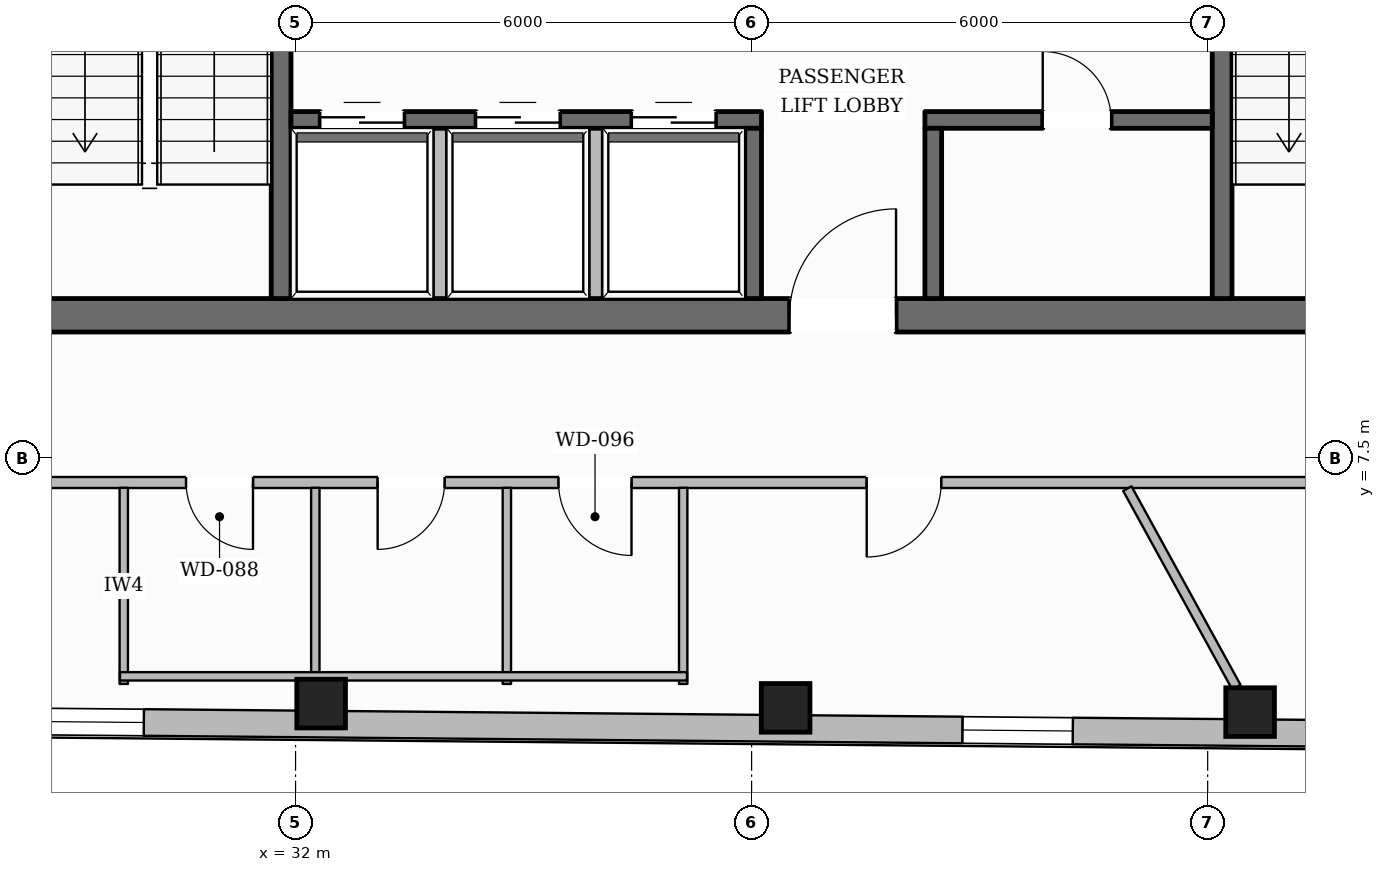
"""IFC4 building model, lengths in metres.
Left out: names, types, materials, properties, quantities, classifications, styles, units other than length and angle.
Written with IfcOpenShell. Run it as: python <this file> out.ifc"""

import sys

from ifc_helpers import new_model, si_unit, direction, frame, frame_2d, origin, origin_2d, place, context, subcontext, project, spatial, rectangle, hollow_rectangle, extrude, element, fill, save


model = new_model("IFC4")
c1 = context("Model", 3, precision=1e-05, world=origin(), true_north=direction((0.0, 1.0)))
c2 = subcontext(c1, "Body", "Model", "MODEL_VIEW")
j1 = project(units=[si_unit("LENGTHUNIT", "METRE"), si_unit("PLANEANGLEUNIT", "RADIAN")], contexts=[c1])
p1 = place(None, origin())
s1 = spatial("IfcSite", under=j1, at=p1, CompositionType="ELEMENT")
p2 = place(p1, origin())
s2 = spatial("IfcBuilding", under=s1, at=p2, CompositionType="ELEMENT")
p3 = place(p2, frame((0.0, 0.0, 180.4)))
s3 = spatial("IfcBuildingStorey", under=s2, at=p3, CompositionType="ELEMENT", Elevation=180.4)
p4 = place(p3, frame((28.04, 9.38, 0.0), z_axis=(0.0, 0.0, 1.0), x_axis=(1.0, 0.0, 0.0)))
e1 = element("IfcWall", 1, at=p4, inside=s3, PredefinedType="SOLIDWALL", context=c2, shape_type="SweptSolid", body=[
    extrude(rectangle(XDim=19.92, YDim=0.44, at=frame_2d((9.96, 0.0))), origin(), (0.0, 0.0, 1.0), 3.6),
])
p5 = place(p4, frame((10.46, 0.0, 0.0)))
e2 = element("IfcOpeningElement", 2, at=p5, cuts=e1, PredefinedType="OPENING", context=c2, shape_type="SweptSolid", body=[
    extrude(rectangle(XDim=1.4, YDim=2.2, at=frame_2d((0.7, 1.1))), frame((0.0, 0.23, 0.0), z_axis=(0.0, -1.0, 0.0), x_axis=(1.0, 0.0, 0.0)), (0.0, 0.0, 1.0), 0.46),
])
p6 = place(p3, frame((31.81, 9.6, 0.0), z_axis=(0.0, 0.0, 1.0), x_axis=(0.0, 1.0, 0.0)))
e3 = element("IfcWall", 3, at=p6, inside=s3, PredefinedType="SHEAR", context=c2, shape_type="SweptSolid", body=[
    extrude(rectangle(XDim=13.0, YDim=0.26, at=frame_2d((6.5, 0.0))), origin(), (0.0, 0.0, 1.0), 3.6),
])
p7 = place(p6, frame((10.925, 0.0, 0.0)))
e4 = element("IfcOpeningElement", 4, at=p7, cuts=e3, PredefinedType="OPENING", context=c2, shape_type="SweptSolid", body=[
    extrude(rectangle(XDim=1.25, YDim=2.25, at=frame_2d((0.625, 1.125))), frame((0.0, 0.14, 0.0), z_axis=(0.0, -1.0, 0.0), x_axis=(1.0, 0.0, 0.0)), (0.0, 0.0, 1.0), 0.28),
])
p8 = place(p3, frame((44.19, 9.6, 0.0), z_axis=(0.0, 0.0, 1.0), x_axis=(0.0, 1.0, 0.0)))
e5 = element("IfcWall", 5, at=p8, inside=s3, PredefinedType="SHEAR", context=c2, shape_type="SweptSolid", body=[
    extrude(rectangle(XDim=13.0, YDim=0.26, at=frame_2d((6.5, 0.0))), origin(), (0.0, 0.0, 1.0), 3.6),
])
p9 = place(p8, frame((10.925, 0.0, 0.0)))
e6 = element("IfcOpeningElement", 6, at=p9, cuts=e5, PredefinedType="OPENING", context=c2, shape_type="SweptSolid", body=[
    extrude(rectangle(XDim=1.25, YDim=2.25, at=frame_2d((0.625, 1.125))), frame((0.0, 0.14, 0.0), z_axis=(0.0, -1.0, 0.0), x_axis=(1.0, 0.0, 0.0)), (0.0, 0.0, 1.0), 0.28),
])
p10 = place(p3, frame((31.94, 11.95, 0.0), z_axis=(0.0, 0.0, 1.0), x_axis=(1.0, 0.0, 0.0)))
e7 = element("IfcWall", 7, at=p10, inside=s3, PredefinedType="SOLIDWALL", context=c2, shape_type="SweptSolid", body=[
    extrude(rectangle(XDim=6.19, YDim=0.22, at=frame_2d((3.095, 0.0))), origin(), (0.0, 0.0, 1.0), 3.6),
])
p11 = place(p10, frame((0.385, 0.0, 0.0)))
e8 = element("IfcOpeningElement", 8, at=p11, cuts=e7, PredefinedType="OPENING", context=c2, shape_type="SweptSolid", body=[
    extrude(rectangle(XDim=1.1, YDim=2.2, at=frame_2d((0.55, 1.1))), frame((0.0, 0.12, 0.0), z_axis=(0.0, -1.0, 0.0), x_axis=(1.0, 0.0, 0.0)), (0.0, 0.0, 1.0), 0.24),
])
p12 = place(p10, frame((2.435, 0.0, 0.0)))
e9 = element("IfcOpeningElement", 9, at=p12, cuts=e7, PredefinedType="OPENING", context=c2, shape_type="SweptSolid", body=[
    extrude(rectangle(XDim=1.1, YDim=2.2, at=frame_2d((0.55, 1.1))), frame((0.0, 0.12, 0.0), z_axis=(0.0, -1.0, 0.0), x_axis=(1.0, 0.0, 0.0)), (0.0, 0.0, 1.0), 0.24),
])
p13 = place(p10, frame((4.485, 0.0, 0.0)))
e10 = element("IfcOpeningElement", 10, at=p13, cuts=e7, PredefinedType="OPENING", context=c2, shape_type="SweptSolid", body=[
    extrude(rectangle(XDim=1.1, YDim=2.2, at=frame_2d((0.55, 1.1))), frame((0.0, 0.12, 0.0), z_axis=(0.0, -1.0, 0.0), x_axis=(1.0, 0.0, 0.0)), (0.0, 0.0, 1.0), 0.24),
])
p14 = place(p3, frame((40.28, 11.95, 0.0), z_axis=(0.0, 0.0, 1.0), x_axis=(1.0, 0.0, 0.0)))
e11 = element("IfcWall", 11, at=p14, inside=s3, PredefinedType="SOLIDWALL", context=c2, shape_type="SweptSolid", body=[
    extrude(rectangle(XDim=3.78, YDim=0.22, at=frame_2d((1.89, 0.0))), origin(), (0.0, 0.0, 1.0), 3.6),
])
p15 = place(p14, frame((1.55, 0.0, 0.0)))
e12 = element("IfcOpeningElement", 12, at=p15, cuts=e11, PredefinedType="OPENING", context=c2, shape_type="SweptSolid", body=[
    extrude(rectangle(XDim=0.9, YDim=2.1, at=frame_2d((0.45, 1.05))), frame((0.0, 0.12, 0.0), z_axis=(0.0, -1.0, 0.0), x_axis=(1.0, 0.0, 0.0)), (0.0, 0.0, 1.0), 0.24),
])
for number, where, z_axis, x_axis in (
    (13, (38.02, 9.6, 0.0), (0.0, 0.0, 1.0), (0.0, 1.0, 0.0)),
    (14, (40.39, 9.6, 0.0), (0.0, 0.0, 1.0), (0.0, 1.0, 0.0)),
):
    element("IfcWall", number, at=place(p3, frame(where, z_axis=z_axis, x_axis=x_axis)), inside=s3, PredefinedType="SOLIDWALL", context=c2, shape_type="SweptSolid", body=[
        extrude(rectangle(XDim=2.24, YDim=0.22, at=frame_2d((1.12, 0.0))), origin(), (0.0, 0.0, 1.0), 3.6),
    ])
for number, where, z_axis, x_axis in (
    (15, (32.336, 4.271, 0.0), (0.0, 0.0, 1.0), (1.0, 0.0, 0.0)),
    (16, (38.448, 4.215, 0.0), (0.0, 0.0, 1.0), (1.0, 0.0, 0.0)),
    (17, (44.558, 4.159, 0.0), (0.0, 0.0, 1.0), (1.0, 0.0, 0.0)),
):
    element("IfcColumn", number, at=place(p3, frame(where, z_axis=z_axis, x_axis=x_axis)), inside=s3, PredefinedType="COLUMN", context=c2, shape_type="SweptSolid", body=[
        extrude(hollow_rectangle(XDim=0.64, YDim=0.64, WallThickness=0.028, at=origin_2d()), origin(), (0.0, 0.0, 1.0), 3.6),
    ])
p16 = place(p3, frame((15.064, 11.953, 0.0), z_axis=(0.0, 0.0, 1.0), x_axis=(0.495993114815, 0.86832645362, 0.0)))
e18 = element("IfcWall", 18, at=p16, inside=s3, PredefinedType="STANDARD", context=c2, shape_type="SweptSolid", body=[
    extrude(rectangle(XDim=37.324, YDim=0.35, at=frame_2d((18.662, 0.0))), origin(), (0.0, 0.0, 1.0), 3.132),
])
p17 = place(p16, frame((33.087, 0.0, 0.65)))
e19 = element("IfcOpeningElement", 19, at=p17, cuts=e18, PredefinedType="OPENING", context=c2, shape_type="SweptSolid", body=[
    extrude(rectangle(XDim=1.45, YDim=1.75, at=frame_2d((0.725, 0.875))), frame((0.0, 0.185, 0.0), z_axis=(0.0, -1.0, 0.0), x_axis=(1.0, 0.0, 0.0)), (0.0, 0.0, 1.0), 0.37),
])
p18 = place(p16, frame((27.026, 0.0, 0.65)))
e20 = element("IfcOpeningElement", 20, at=p18, cuts=e18, PredefinedType="OPENING", context=c2, shape_type="SweptSolid", body=[
    extrude(rectangle(XDim=1.45, YDim=1.75, at=frame_2d((0.725, 0.875))), frame((0.0, 0.185, 0.0), z_axis=(0.0, -1.0, 0.0), x_axis=(1.0, 0.0, 0.0)), (0.0, 0.0, 1.0), 0.37),
])
p19 = place(p16, frame((14.904, 0.0, 0.65)))
e21 = element("IfcOpeningElement", 21, at=p19, cuts=e18, PredefinedType="OPENING", context=c2, shape_type="SweptSolid", body=[
    extrude(rectangle(XDim=1.45, YDim=1.75, at=frame_2d((0.725, 0.875))), frame((0.0, 0.185, 0.0), z_axis=(0.0, -1.0, 0.0), x_axis=(1.0, 0.0, 0.0)), (0.0, 0.0, 1.0), 0.37),
])
p20 = place(p16, frame((8.844, 0.0, 0.65)))
e22 = element("IfcOpeningElement", 22, at=p20, cuts=e18, PredefinedType="OPENING", context=c2, shape_type="SweptSolid", body=[
    extrude(rectangle(XDim=1.45, YDim=1.75, at=frame_2d((0.725, 0.875))), frame((0.0, 0.185, 0.0), z_axis=(0.0, -1.0, 0.0), x_axis=(1.0, 0.0, 0.0)), (0.0, 0.0, 1.0), 0.37),
])
p21 = place(p16, frame((2.782, 0.0, 0.65)))
e23 = element("IfcOpeningElement", 23, at=p21, cuts=e18, PredefinedType="OPENING", context=c2, shape_type="SweptSolid", body=[
    extrude(rectangle(XDim=1.45, YDim=1.75, at=frame_2d((0.725, 0.875))), frame((0.0, 0.185, 0.0), z_axis=(0.0, -1.0, 0.0), x_axis=(1.0, 0.0, 0.0)), (0.0, 0.0, 1.0), 0.37),
])
p22 = place(p3, frame((57.259, 3.773, 0.0), z_axis=(0.0, 0.0, 1.0), x_axis=(-0.999958016909, 0.009163210113, 0.0)))
e24 = element("IfcWall", 24, at=p22, inside=s3, PredefinedType="STANDARD", context=c2, shape_type="SweptSolid", body=[
    extrude(rectangle(XDim=37.621, YDim=0.35, at=frame_2d((18.81, 0.0))), origin(), (0.0, 0.0, 1.0), 3.132),
])
p23 = place(p22, frame((33.368, 0.0, 0.65)))
e25 = element("IfcOpeningElement", 25, at=p23, cuts=e24, PredefinedType="OPENING", context=c2, shape_type="SweptSolid", body=[
    extrude(rectangle(XDim=1.45, YDim=1.75, at=frame_2d((0.725, 0.875))), frame((0.0, 0.185, 0.0), z_axis=(0.0, -1.0, 0.0), x_axis=(1.0, 0.0, 0.0)), (0.0, 0.0, 1.0), 0.37),
])
p24 = place(p22, frame((27.257, 0.0, 0.65)))
e26 = element("IfcOpeningElement", 26, at=p24, cuts=e24, PredefinedType="OPENING", context=c2, shape_type="SweptSolid", body=[
    extrude(rectangle(XDim=1.45, YDim=1.75, at=frame_2d((0.725, 0.875))), frame((0.0, 0.185, 0.0), z_axis=(0.0, -1.0, 0.0), x_axis=(1.0, 0.0, 0.0)), (0.0, 0.0, 1.0), 0.37),
])
p25 = place(p22, frame((15.034, 0.0, 0.65)))
e27 = element("IfcOpeningElement", 27, at=p25, cuts=e24, PredefinedType="OPENING", context=c2, shape_type="SweptSolid", body=[
    extrude(rectangle(XDim=1.45, YDim=1.75, at=frame_2d((0.725, 0.875))), frame((0.0, 0.185, 0.0), z_axis=(0.0, -1.0, 0.0), x_axis=(1.0, 0.0, 0.0)), (0.0, 0.0, 1.0), 0.37),
])
p26 = place(p22, frame((8.923, 0.0, 0.65)))
e28 = element("IfcOpeningElement", 28, at=p26, cuts=e24, PredefinedType="OPENING", context=c2, shape_type="SweptSolid", body=[
    extrude(rectangle(XDim=1.45, YDim=1.75, at=frame_2d((0.725, 0.875))), frame((0.0, 0.185, 0.0), z_axis=(0.0, -1.0, 0.0), x_axis=(1.0, 0.0, 0.0)), (0.0, 0.0, 1.0), 0.37),
])
p27 = place(p22, frame((2.812, 0.0, 0.65)))
e29 = element("IfcOpeningElement", 29, at=p27, cuts=e24, PredefinedType="OPENING", context=c2, shape_type="SweptSolid", body=[
    extrude(rectangle(XDim=1.45, YDim=1.75, at=frame_2d((0.725, 0.875))), frame((0.0, 0.185, 0.0), z_axis=(0.0, -1.0, 0.0), x_axis=(1.0, 0.0, 0.0)), (0.0, 0.0, 1.0), 0.37),
])
p28 = place(p3, frame((42.575, 44.272, 0.0), z_axis=(0.0, 0.0, 1.0), x_axis=(0.503934681705, -0.863741764982, 0.0)))
e30 = element("IfcWall", 30, at=p28, inside=s3, PredefinedType="STANDARD", context=c2, shape_type="SweptSolid", body=[
    extrude(rectangle(XDim=37.915, YDim=0.35, at=frame_2d((18.958, 0.0))), origin(), (0.0, 0.0, 1.0), 3.132),
])
p29 = place(p28, frame((33.633, 0.0, 0.65)))
e31 = element("IfcOpeningElement", 31, at=p29, cuts=e30, PredefinedType="OPENING", context=c2, shape_type="SweptSolid", body=[
    extrude(rectangle(XDim=1.45, YDim=1.75, at=frame_2d((0.725, 0.875))), frame((0.0, 0.185, 0.0), z_axis=(0.0, -1.0, 0.0), x_axis=(1.0, 0.0, 0.0)), (0.0, 0.0, 1.0), 0.37),
])
p30 = place(p28, frame((27.472, 0.0, 0.65)))
e32 = element("IfcOpeningElement", 32, at=p30, cuts=e30, PredefinedType="OPENING", context=c2, shape_type="SweptSolid", body=[
    extrude(rectangle(XDim=1.45, YDim=1.75, at=frame_2d((0.725, 0.875))), frame((0.0, 0.185, 0.0), z_axis=(0.0, -1.0, 0.0), x_axis=(1.0, 0.0, 0.0)), (0.0, 0.0, 1.0), 0.37),
])
p31 = place(p28, frame((15.15, 0.0, 0.65)))
e33 = element("IfcOpeningElement", 33, at=p31, cuts=e30, PredefinedType="OPENING", context=c2, shape_type="SweptSolid", body=[
    extrude(rectangle(XDim=1.45, YDim=1.75, at=frame_2d((0.725, 0.875))), frame((0.0, 0.185, 0.0), z_axis=(0.0, -1.0, 0.0), x_axis=(1.0, 0.0, 0.0)), (0.0, 0.0, 1.0), 0.37),
])
p32 = place(p28, frame((8.989, 0.0, 0.65)))
e34 = element("IfcOpeningElement", 34, at=p32, cuts=e30, PredefinedType="OPENING", context=c2, shape_type="SweptSolid", body=[
    extrude(rectangle(XDim=1.45, YDim=1.75, at=frame_2d((0.725, 0.875))), frame((0.0, 0.185, 0.0), z_axis=(0.0, -1.0, 0.0), x_axis=(1.0, 0.0, 0.0)), (0.0, 0.0, 1.0), 0.37),
])
p33 = place(p28, frame((2.828, 0.0, 0.65)))
e35 = element("IfcOpeningElement", 35, at=p33, cuts=e30, PredefinedType="OPENING", context=c2, shape_type="SweptSolid", body=[
    extrude(rectangle(XDim=1.45, YDim=1.75, at=frame_2d((0.725, 0.875))), frame((0.0, 0.185, 0.0), z_axis=(0.0, -1.0, 0.0), x_axis=(1.0, 0.0, 0.0)), (0.0, 0.0, 1.0), 0.37),
])
for number, where, z_axis, x_axis in (
    (36, (33.9, 9.52, 0.0), (0.0, 0.0, 1.0), (0.0, 1.0, 0.0)),
    (37, (35.95, 9.52, 0.0), (0.0, 0.0, 1.0), (0.0, 1.0, 0.0)),
):
    element("IfcWall", number, at=place(p3, frame(where, z_axis=z_axis, x_axis=x_axis)), inside=s3, PredefinedType="PARTITIONING", context=c2, shape_type="SweptSolid", body=[
        extrude(rectangle(XDim=2.32, YDim=0.165, at=frame_2d((1.16, 0.0))), origin(), (0.0, 0.0, 1.0), 3.6),
    ])
p34 = place(p3, frame((49.94, 7.18, 0.0), z_axis=(0.0, 0.0, 1.0), x_axis=(-1.0, 0.0, 0.0)))
e38 = element("IfcWall", 38, at=p34, inside=s3, PredefinedType="PARTITIONING", context=c2, shape_type="SweptSolid", body=[
    extrude(rectangle(XDim=23.88, YDim=0.145, at=frame_2d((11.94, 0.0))), origin(), (0.0, 0.0, 1.0), 3.6),
])
p35 = place(p34, frame((18.5, 0.0, 0.0)))
e39 = element("IfcOpeningElement", 39, at=p35, cuts=e38, PredefinedType="OPENING", context=c2, shape_type="SweptSolid", body=[
    extrude(rectangle(XDim=0.88, YDim=2.1, at=frame_2d((0.44, 1.05))), frame((0.0, 0.083, 0.0), z_axis=(0.0, -1.0, 0.0), x_axis=(1.0, 0.0, 0.0)), (0.0, 0.0, 1.0), 0.165),
])
p36 = place(p34, frame((15.98, 0.0, 0.0)))
e40 = element("IfcOpeningElement", 40, at=p36, cuts=e38, PredefinedType="OPENING", context=c2, shape_type="SweptSolid", body=[
    extrude(rectangle(XDim=0.88, YDim=2.1, at=frame_2d((0.44, 1.05))), frame((0.0, 0.083, 0.0), z_axis=(0.0, -1.0, 0.0), x_axis=(1.0, 0.0, 0.0)), (0.0, 0.0, 1.0), 0.165),
])
p37 = place(p34, frame((13.52, 0.0, 0.0)))
e41 = element("IfcOpeningElement", 41, at=p37, cuts=e38, PredefinedType="OPENING", context=c2, shape_type="SweptSolid", body=[
    extrude(rectangle(XDim=0.96, YDim=2.1, at=frame_2d((0.48, 1.05))), frame((0.0, 0.083, 0.0), z_axis=(0.0, -1.0, 0.0), x_axis=(1.0, 0.0, 0.0)), (0.0, 0.0, 1.0), 0.165),
])
p38 = place(p34, frame((9.446, 0.0, 0.0)))
e42 = element("IfcOpeningElement", 42, at=p38, cuts=e38, PredefinedType="OPENING", context=c2, shape_type="SweptSolid", body=[
    extrude(rectangle(XDim=0.98, YDim=2.15, at=frame_2d((0.49, 1.075))), frame((0.0, 0.083, 0.0), z_axis=(0.0, -1.0, 0.0), x_axis=(1.0, 0.0, 0.0)), (0.0, 0.0, 1.0), 0.165),
])
p39 = place(p3, frame((29.74, 4.53, 0.0), z_axis=(0.0, 0.0, 1.0), x_axis=(0.0, 1.0, 0.0)))
e43 = element("IfcWall", 43, at=p39, inside=s3, PredefinedType="PLUMBINGWALL", context=c2, shape_type="SweptSolid", body=[
    extrude(rectangle(XDim=2.58, YDim=0.11, at=frame_2d((1.29, 0.0))), origin(), (0.0, 0.0, 1.0), 3.6),
])
p40 = place(p3, frame((32.26, 4.53, 0.0), z_axis=(0.0, 0.0, 1.0), x_axis=(0.0, 1.0, 0.0)))
e44 = element("IfcWall", 44, at=p40, inside=s3, PredefinedType="PLUMBINGWALL", context=c2, shape_type="SweptSolid", body=[
    extrude(rectangle(XDim=2.58, YDim=0.11, at=frame_2d((1.29, 0.0))), origin(), (0.0, 0.0, 1.0), 3.141),
])
for number, where, z_axis, x_axis in (
    (45, (34.78, 4.53, 0.0), (0.0, 0.0, 1.0), (0.0, 1.0, 0.0)),
    (46, (37.1, 4.53, 0.0), (0.0, 0.0, 1.0), (0.0, 1.0, 0.0)),
):
    element("IfcWall", number, at=place(p3, frame(where, z_axis=z_axis, x_axis=x_axis)), inside=s3, PredefinedType="PLUMBINGWALL", context=c2, shape_type="SweptSolid", body=[
        extrude(rectangle(XDim=2.58, YDim=0.11, at=frame_2d((1.29, 0.0))), origin(), (0.0, 0.0, 1.0), 3.6),
    ])
p41 = place(p3, frame((29.69, 4.63, 0.0), z_axis=(0.0, 0.0, 1.0), x_axis=(1.0, 0.0, 0.0)))
e47 = element("IfcWall", 47, at=p41, inside=s3, PredefinedType="PLUMBINGWALL", context=c2, shape_type="SweptSolid", body=[
    extrude(rectangle(XDim=7.46, YDim=0.11, at=frame_2d((3.73, 0.0))), origin(), (0.0, 0.0, 1.0), 3.6),
])
p42 = place(p3, frame((42.943, 7.1, 0.0), z_axis=(0.0, 0.0, 1.0), x_axis=(0.481352610258, -0.876527047271, 0.0)))
e48 = element("IfcWall", 48, at=p42, inside=s3, PredefinedType="PARTITIONING", context=c2, shape_type="SweptSolid", body=[
    extrude(rectangle(XDim=2.98, YDim=0.125, at=frame_2d((1.49, 0.0))), origin(), (0.0, 0.0, 1.0), 3.6),
])
p43 = place(p24, origin())
e49 = element("IfcWindow", 49, at=p43, inside=s3, PartitioningType="SINGLE_PANEL", PredefinedType="WINDOW", context=c2, shape_type="SweptSolid", body=[
    extrude(rectangle(XDim=1.45, YDim=1.75, at=frame_2d((0.725, 0.875))), frame((0.0, 0.03, 0.0), z_axis=(0.0, -1.0, 0.0), x_axis=(1.0, 0.0, 0.0)), (0.0, 0.0, 1.0), 0.06),
])
fill(e26, e49)
p44 = place(p25, origin())
e50 = element("IfcWindow", 50, at=p44, inside=s3, PartitioningType="SINGLE_PANEL", PredefinedType="WINDOW", context=c2, shape_type="SweptSolid", body=[
    extrude(rectangle(XDim=1.45, YDim=1.75, at=frame_2d((0.725, 0.875))), frame((0.0, 0.03, 0.0), z_axis=(0.0, -1.0, 0.0), x_axis=(1.0, 0.0, 0.0)), (0.0, 0.0, 1.0), 0.06),
])
fill(e27, e50)
p45 = place(p5, origin())
e51 = element("IfcDoor", 51, at=p45, inside=s3, OperationType="SINGLE_SWING_RIGHT", PredefinedType="DOOR", context=c2, shape_type="SweptSolid", body=[
    extrude(rectangle(XDim=1.4, YDim=2.2, at=frame_2d((0.7, 1.1))), frame((0.0, 0.025, 0.0), z_axis=(0.0, -1.0, 0.0), x_axis=(1.0, 0.0, 0.0)), (0.0, 0.0, 1.0), 0.05),
])
fill(e2, e51)
p46 = place(p11, origin())
e52 = element("IfcDoor", 52, at=p46, inside=s3, OperationType="DOUBLE_DOOR_SLIDING", PredefinedType="DOOR", context=c2, shape_type="SweptSolid", body=[
    extrude(rectangle(XDim=1.1, YDim=2.2, at=frame_2d((0.55, 1.1))), frame((0.0, 0.025, 0.0), z_axis=(0.0, -1.0, 0.0), x_axis=(1.0, 0.0, 0.0)), (0.0, 0.0, 1.0), 0.05),
])
fill(e8, e52)
p47 = place(p12, origin())
e53 = element("IfcDoor", 53, at=p47, inside=s3, OperationType="DOUBLE_DOOR_SLIDING", PredefinedType="DOOR", context=c2, shape_type="SweptSolid", body=[
    extrude(rectangle(XDim=1.1, YDim=2.2, at=frame_2d((0.55, 1.1))), frame((0.0, 0.025, 0.0), z_axis=(0.0, -1.0, 0.0), x_axis=(1.0, 0.0, 0.0)), (0.0, 0.0, 1.0), 0.05),
])
fill(e9, e53)
p48 = place(p13, origin())
e54 = element("IfcDoor", 54, at=p48, inside=s3, OperationType="DOUBLE_DOOR_SLIDING", PredefinedType="DOOR", context=c2, shape_type="SweptSolid", body=[
    extrude(rectangle(XDim=1.1, YDim=2.2, at=frame_2d((0.55, 1.1))), frame((0.0, 0.025, 0.0), z_axis=(0.0, -1.0, 0.0), x_axis=(1.0, 0.0, 0.0)), (0.0, 0.0, 1.0), 0.05),
])
fill(e10, e54)
p49 = place(p15, origin())
e55 = element("IfcDoor", 55, at=p49, inside=s3, OperationType="SINGLE_SWING_LEFT", PredefinedType="DOOR", context=c2, shape_type="SweptSolid", body=[
    extrude(rectangle(XDim=0.9, YDim=2.1, at=frame_2d((0.45, 1.05))), frame((0.0, 0.025, 0.0), z_axis=(0.0, -1.0, 0.0), x_axis=(1.0, 0.0, 0.0)), (0.0, 0.0, 1.0), 0.05),
])
fill(e12, e55)
p50 = place(p35, origin())
e56 = element("IfcDoor", 56, at=p50, inside=s3, OperationType="SINGLE_SWING_LEFT", PredefinedType="DOOR", context=c2, shape_type="SweptSolid", body=[
    extrude(rectangle(XDim=0.88, YDim=2.1, at=frame_2d((0.44, 1.05))), frame((0.0, 0.025, 0.0), z_axis=(0.0, -1.0, 0.0), x_axis=(1.0, 0.0, 0.0)), (0.0, 0.0, 1.0), 0.05),
])
fill(e39, e56)
p51 = place(p36, origin())
e57 = element("IfcDoor", 57, at=p51, inside=s3, OperationType="SINGLE_SWING_RIGHT", PredefinedType="DOOR", context=c2, shape_type="SweptSolid", body=[
    extrude(rectangle(XDim=0.88, YDim=2.1, at=frame_2d((0.44, 1.05))), frame((0.0, 0.025, 0.0), z_axis=(0.0, -1.0, 0.0), x_axis=(1.0, 0.0, 0.0)), (0.0, 0.0, 1.0), 0.05),
])
fill(e40, e57)
p52 = place(p37, origin())
e58 = element("IfcDoor", 58, at=p52, inside=s3, OperationType="SINGLE_SWING_LEFT", PredefinedType="DOOR", context=c2, shape_type="SweptSolid", body=[
    extrude(rectangle(XDim=0.96, YDim=2.1, at=frame_2d((0.48, 1.05))), frame((0.0, 0.025, 0.0), z_axis=(0.0, -1.0, 0.0), x_axis=(1.0, 0.0, 0.0)), (0.0, 0.0, 1.0), 0.05),
])
fill(e41, e58)
p53 = place(p38, origin())
e59 = element("IfcDoor", 59, at=p53, inside=s3, OperationType="SINGLE_SWING_RIGHT", PredefinedType="DOOR", context=c2, shape_type="SweptSolid", body=[
    extrude(rectangle(XDim=0.98, YDim=2.15, at=frame_2d((0.49, 1.075))), frame((0.0, 0.025, 0.0), z_axis=(0.0, -1.0, 0.0), x_axis=(1.0, 0.0, 0.0)), (0.0, 0.0, 1.0), 0.05),
])
fill(e42, e59)
save(model, sys.argv[1])
